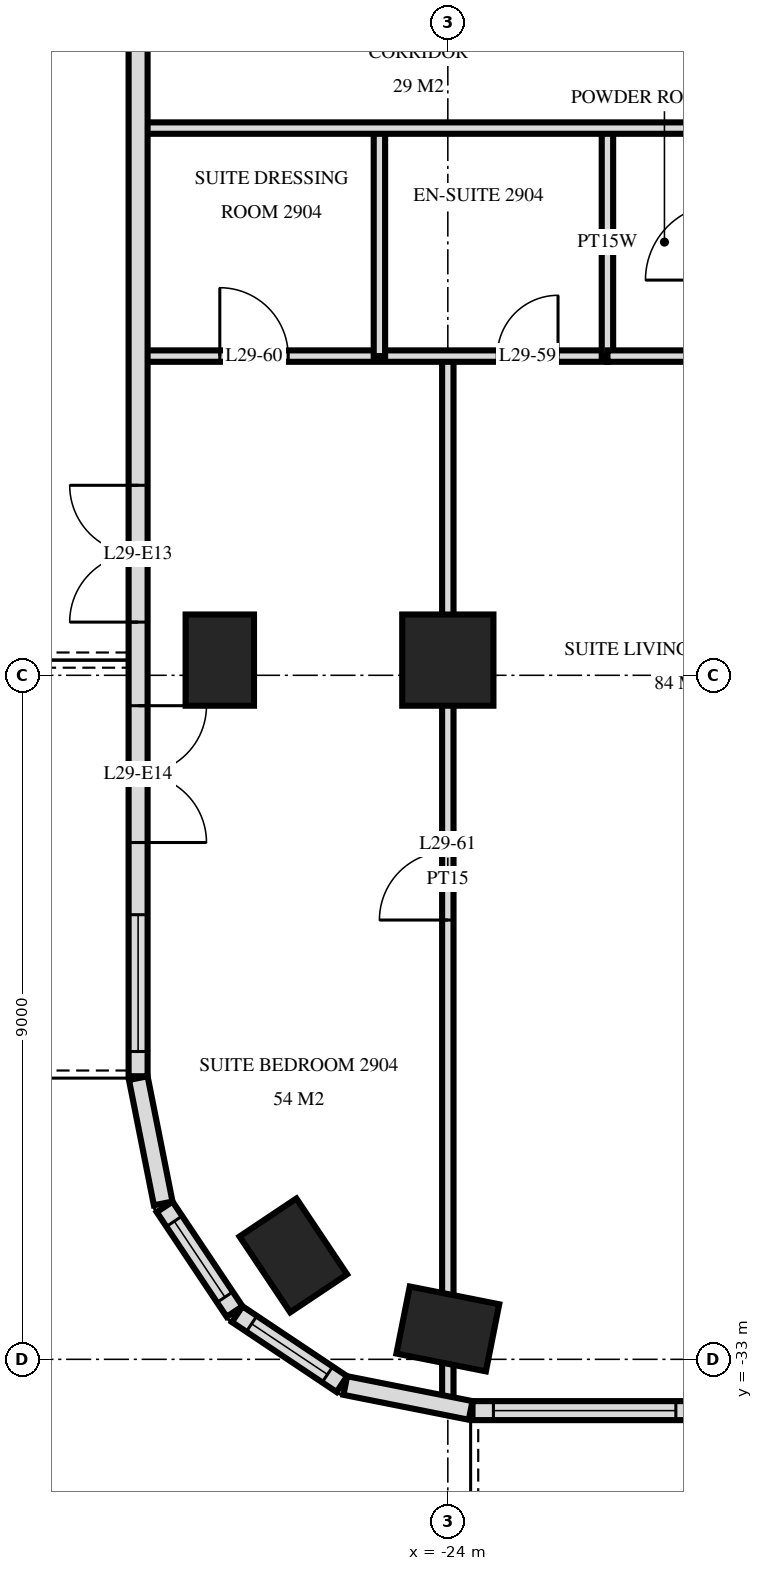
"""IFC4 building model, lengths in metres.
Left out: names, types, materials, properties, quantities, classifications, styles, units other than length and angle.
Written with IfcOpenShell. Run it as: python <this file> out.ifc"""

import sys

from ifc_helpers import new_model, si_unit, direction, frame, frame_2d, origin, origin_2d, place, context, subcontext, project, spatial, rectangle, extrude, element, fill, save


model = new_model("IFC4")
c1 = context("Model", 3, precision=1e-05, world=origin(), true_north=direction((0.0, 1.0)))
c2 = subcontext(c1, "Body", "Model", "MODEL_VIEW")
j1 = project(units=[si_unit("LENGTHUNIT", "METRE"), si_unit("PLANEANGLEUNIT", "RADIAN")], contexts=[c1])
p1 = place(None, origin())
s1 = spatial("IfcSite", under=j1, at=p1, CompositionType="ELEMENT")
p2 = place(p1, origin())
s2 = spatial("IfcBuilding", under=s1, at=p2, CompositionType="ELEMENT")
p3 = place(p2, frame((0.0, 0.0, 116.4)))
s3 = spatial("IfcBuildingStorey", under=s2, at=p3, CompositionType="ELEMENT", Elevation=116.4)
for number, where, z_axis, x_axis in (
    (1, (-27.0, -23.8, 0.0), (0.0, 0.0, 1.0), (0.0, 1.0, 0.0)),
    (2, (-26.033, -31.633, 0.0), (0.0, 0.0, 1.0), (-0.556, 0.831, 0.0)),
    (3, (-24.0, -32.6, 0.0), (0.0, 0.0, 1.0), (-0.981, 0.195, 0.0)),
):
    element("IfcColumn", number, at=place(p3, frame(where, z_axis=z_axis, x_axis=x_axis)), inside=s3, PredefinedType="COLUMN", context=c2, shape_type="SweptSolid", body=[
        extrude(rectangle(XDim=1.2, YDim=0.9, at=origin_2d()), origin(), (0.0, 0.0, 1.0), 3.6),
    ])
p4 = place(p3, frame((-24.0, -23.8, 0.0), z_axis=(0.0, 0.0, 1.0), x_axis=(1.0, 0.0, 0.0)))
e4 = element("IfcColumn", 4, at=p4, inside=s3, PredefinedType="COLUMN", context=c2, shape_type="SweptSolid", body=[
    extrude(rectangle(XDim=1.2, YDim=1.2, at=origin_2d()), origin(), (0.0, 0.0, 1.0), 3.6),
])
p5 = place(p3, frame((-28.075, -3.325, 0.0), z_axis=(0.0, 0.0, 1.0), x_axis=(0.0, -1.0, 0.0)))
e5 = element("IfcWall", 5, at=p5, inside=s3, PredefinedType="SOLIDWALL", context=c2, shape_type="SweptSolid", body=[
    extrude(rectangle(XDim=25.951, YDim=0.25, at=frame_2d((12.975, 0.0))), origin(), (0.0, 0.0, 1.0), 3.32),
])
p6 = place(p5, frame((7.025, 0.0, 0.0)))
e6 = element("IfcOpeningElement", 6, at=p6, cuts=e5, PredefinedType="OPENING", context=c2, shape_type="SweptSolid", body=[
    extrude(rectangle(XDim=1.8, YDim=2.4, at=frame_2d((0.9, 1.2))), frame((0.0, 0.135, 0.0), z_axis=(0.0, -1.0, 0.0), x_axis=(1.0, 0.0, 0.0)), (0.0, 0.0, 1.0), 0.27),
])
p7 = place(p5, frame((18.175, 0.0, 0.0)))
e7 = element("IfcOpeningElement", 7, at=p7, cuts=e5, PredefinedType="OPENING", context=c2, shape_type="SweptSolid", body=[
    extrude(rectangle(XDim=1.8, YDim=2.4, at=frame_2d((0.9, 1.2))), frame((0.0, 0.135, 0.0), z_axis=(0.0, -1.0, 0.0), x_axis=(1.0, 0.0, 0.0)), (0.0, 0.0, 1.0), 0.27),
])
p8 = place(p5, frame((21.075, 0.0, 0.0)))
e8 = element("IfcOpeningElement", 8, at=p8, cuts=e5, PredefinedType="OPENING", context=c2, shape_type="SweptSolid", body=[
    extrude(rectangle(XDim=1.8, YDim=2.4, at=frame_2d((0.9, 1.2))), frame((0.0, 0.135, 0.0), z_axis=(0.0, -1.0, 0.0), x_axis=(1.0, 0.0, 0.0)), (0.0, 0.0, 1.0), 0.27),
])
p9 = place(p5, frame((23.825, 0.0, 0.3)))
e9 = element("IfcOpeningElement", 9, at=p9, cuts=e5, PredefinedType="OPENING", context=c2, shape_type="SweptSolid", body=[
    extrude(rectangle(XDim=1.8, YDim=2.1, at=frame_2d((0.9, 1.05))), frame((0.0, 0.135, 0.0), z_axis=(0.0, -1.0, 0.0), x_axis=(1.0, 0.0, 0.0)), (0.0, 0.0, 1.0), 0.27),
])
p10 = place(p3, frame((-28.073, -29.3, 0.0), z_axis=(0.0, 0.0, 1.0), x_axis=(0.194999110559, -0.980803419081, 0.0)))
e10 = element("IfcWall", 10, at=p10, inside=s3, PredefinedType="SOLIDWALL", context=c2, shape_type="SweptSolid", body=[
    extrude(rectangle(XDim=1.681, YDim=0.25, at=frame_2d((0.841, 0.0))), origin(), (0.0, 0.0, 1.0), 3.32),
])
p11 = place(p3, frame((-27.726, -30.994, 0.0), z_axis=(0.0, 0.0, 1.0), x_axis=(0.55555029066, -0.831482937015, 0.0)))
e11 = element("IfcWall", 11, at=p11, inside=s3, PredefinedType="SOLIDWALL", context=c2, shape_type="SweptSolid", body=[
    extrude(rectangle(XDim=1.656, YDim=0.25, at=frame_2d((0.828, 0.0))), origin(), (0.0, 0.0, 1.0), 3.32),
])
p12 = place(p11, frame((0.228, 0.0, 0.9)))
e12 = element("IfcOpeningElement", 12, at=p12, cuts=e11, PredefinedType="OPENING", context=c2, shape_type="SweptSolid", body=[
    extrude(rectangle(XDim=1.2, YDim=1.5, at=frame_2d((0.6, 0.75))), frame((0.0, 0.135, 0.0), z_axis=(0.0, -1.0, 0.0), x_axis=(1.0, 0.0, 0.0)), (0.0, 0.0, 1.0), 0.27),
])
p13 = place(p3, frame((-26.771, -32.406, 0.0), z_axis=(0.0, 0.0, 1.0), x_axis=(0.831482937015, -0.55555029066, 0.0)))
e13 = element("IfcWall", 13, at=p13, inside=s3, PredefinedType="SOLIDWALL", context=c2, shape_type="SweptSolid", body=[
    extrude(rectangle(XDim=1.656, YDim=0.25, at=frame_2d((0.828, 0.0))), origin(), (0.0, 0.0, 1.0), 3.32),
])
p14 = place(p13, frame((0.228, 0.0, 0.9)))
e14 = element("IfcOpeningElement", 14, at=p14, cuts=e13, PredefinedType="OPENING", context=c2, shape_type="SweptSolid", body=[
    extrude(rectangle(XDim=1.2, YDim=1.5, at=frame_2d((0.6, 0.75))), frame((0.0, 0.135, 0.0), z_axis=(0.0, -1.0, 0.0), x_axis=(1.0, 0.0, 0.0)), (0.0, 0.0, 1.0), 0.27),
])
p15 = place(p3, frame((-25.349, -33.344, 0.0), z_axis=(0.0, 0.0, 1.0), x_axis=(0.980775640221, -0.19513878023, 0.0)))
e15 = element("IfcWall", 15, at=p15, inside=s3, PredefinedType="SOLIDWALL", context=c2, shape_type="SweptSolid", body=[
    extrude(rectangle(XDim=1.681, YDim=0.25, at=frame_2d((0.841, 0.0))), origin(), (0.0, 0.0, 1.0), 3.32),
])
p16 = place(p3, frame((-23.675, -33.675, 0.0), z_axis=(0.0, 0.0, 1.0), x_axis=(1.0, 0.0, 0.0)))
e16 = element("IfcWall", 16, at=p16, inside=s3, PredefinedType="SOLIDWALL", context=c2, shape_type="SweptSolid", body=[
    extrude(rectangle(XDim=47.351, YDim=0.25, at=frame_2d((23.675, 0.0))), origin(), (0.0, 0.0, 1.0), 3.32),
])
p17 = place(p16, frame((0.275, 0.0, 0.3)))
e17 = element("IfcOpeningElement", 17, at=p17, cuts=e16, PredefinedType="OPENING", context=c2, shape_type="SweptSolid", body=[
    extrude(rectangle(XDim=2.4, YDim=2.1, at=frame_2d((1.2, 1.05))), frame((0.0, 0.135, 0.0), z_axis=(0.0, -1.0, 0.0), x_axis=(1.0, 0.0, 0.0)), (0.0, 0.0, 1.0), 0.27),
])
p18 = place(p16, frame((3.425, 0.0, 0.0)))
e18 = element("IfcOpeningElement", 18, at=p18, cuts=e16, PredefinedType="OPENING", context=c2, shape_type="SweptSolid", body=[
    extrude(rectangle(XDim=1.8, YDim=2.4, at=frame_2d((0.9, 1.2))), frame((0.0, 0.135, 0.0), z_axis=(0.0, -1.0, 0.0), x_axis=(1.0, 0.0, 0.0)), (0.0, 0.0, 1.0), 0.27),
])
p19 = place(p16, frame((5.975, 0.0, 0.3)))
e19 = element("IfcOpeningElement", 19, at=p19, cuts=e16, PredefinedType="OPENING", context=c2, shape_type="SweptSolid", body=[
    extrude(rectangle(XDim=2.4, YDim=2.1, at=frame_2d((1.2, 1.05))), frame((0.0, 0.135, 0.0), z_axis=(0.0, -1.0, 0.0), x_axis=(1.0, 0.0, 0.0)), (0.0, 0.0, 1.0), 0.27),
])
p20 = place(p16, frame((9.275, 0.0, 0.0)))
e20 = element("IfcOpeningElement", 20, at=p20, cuts=e16, PredefinedType="OPENING", context=c2, shape_type="SweptSolid", body=[
    extrude(rectangle(XDim=1.8, YDim=2.4, at=frame_2d((0.9, 1.2))), frame((0.0, 0.135, 0.0), z_axis=(0.0, -1.0, 0.0), x_axis=(1.0, 0.0, 0.0)), (0.0, 0.0, 1.0), 0.27),
])
p21 = place(p16, frame((12.275, 0.0, 0.0)))
e21 = element("IfcOpeningElement", 21, at=p21, cuts=e16, PredefinedType="OPENING", context=c2, shape_type="SweptSolid", body=[
    extrude(rectangle(XDim=1.8, YDim=2.4, at=frame_2d((0.9, 1.2))), frame((0.0, 0.135, 0.0), z_axis=(0.0, -1.0, 0.0), x_axis=(1.0, 0.0, 0.0)), (0.0, 0.0, 1.0), 0.27),
])
p22 = place(p16, frame((14.975, 0.0, 0.3)))
e22 = element("IfcOpeningElement", 22, at=p22, cuts=e16, PredefinedType="OPENING", context=c2, shape_type="SweptSolid", body=[
    extrude(rectangle(XDim=2.4, YDim=2.1, at=frame_2d((1.2, 1.05))), frame((0.0, 0.135, 0.0), z_axis=(0.0, -1.0, 0.0), x_axis=(1.0, 0.0, 0.0)), (0.0, 0.0, 1.0), 0.27),
])
p23 = place(p16, frame((17.975, 0.0, 0.3)))
e23 = element("IfcOpeningElement", 23, at=p23, cuts=e16, PredefinedType="OPENING", context=c2, shape_type="SweptSolid", body=[
    extrude(rectangle(XDim=2.4, YDim=2.1, at=frame_2d((1.2, 1.05))), frame((0.0, 0.135, 0.0), z_axis=(0.0, -1.0, 0.0), x_axis=(1.0, 0.0, 0.0)), (0.0, 0.0, 1.0), 0.27),
])
p24 = place(p16, frame((21.275, 0.0, 0.0)))
e24 = element("IfcOpeningElement", 24, at=p24, cuts=e16, PredefinedType="OPENING", context=c2, shape_type="SweptSolid", body=[
    extrude(rectangle(XDim=1.8, YDim=2.4, at=frame_2d((0.9, 1.2))), frame((0.0, 0.135, 0.0), z_axis=(0.0, -1.0, 0.0), x_axis=(1.0, 0.0, 0.0)), (0.0, 0.0, 1.0), 0.27),
])
p25 = place(p16, frame((24.275, 0.0, 0.0)))
e25 = element("IfcOpeningElement", 25, at=p25, cuts=e16, PredefinedType="OPENING", context=c2, shape_type="SweptSolid", body=[
    extrude(rectangle(XDim=1.8, YDim=2.4, at=frame_2d((0.9, 1.2))), frame((0.0, 0.135, 0.0), z_axis=(0.0, -1.0, 0.0), x_axis=(1.0, 0.0, 0.0)), (0.0, 0.0, 1.0), 0.27),
])
p26 = place(p16, frame((26.975, 0.0, 0.3)))
e26 = element("IfcOpeningElement", 26, at=p26, cuts=e16, PredefinedType="OPENING", context=c2, shape_type="SweptSolid", body=[
    extrude(rectangle(XDim=2.4, YDim=2.1, at=frame_2d((1.2, 1.05))), frame((0.0, 0.135, 0.0), z_axis=(0.0, -1.0, 0.0), x_axis=(1.0, 0.0, 0.0)), (0.0, 0.0, 1.0), 0.27),
])
p27 = place(p16, frame((30.275, 0.0, 0.0)))
e27 = element("IfcOpeningElement", 27, at=p27, cuts=e16, PredefinedType="OPENING", context=c2, shape_type="SweptSolid", body=[
    extrude(rectangle(XDim=1.8, YDim=2.4, at=frame_2d((0.9, 1.2))), frame((0.0, 0.135, 0.0), z_axis=(0.0, -1.0, 0.0), x_axis=(1.0, 0.0, 0.0)), (0.0, 0.0, 1.0), 0.27),
])
p28 = place(p16, frame((32.975, 0.0, 0.3)))
e28 = element("IfcOpeningElement", 28, at=p28, cuts=e16, PredefinedType="OPENING", context=c2, shape_type="SweptSolid", body=[
    extrude(rectangle(XDim=2.4, YDim=2.1, at=frame_2d((1.2, 1.05))), frame((0.0, 0.135, 0.0), z_axis=(0.0, -1.0, 0.0), x_axis=(1.0, 0.0, 0.0)), (0.0, 0.0, 1.0), 0.27),
])
p29 = place(p16, frame((35.975, 0.0, 0.3)))
e29 = element("IfcOpeningElement", 29, at=p29, cuts=e16, PredefinedType="OPENING", context=c2, shape_type="SweptSolid", body=[
    extrude(rectangle(XDim=2.4, YDim=2.1, at=frame_2d((1.2, 1.05))), frame((0.0, 0.135, 0.0), z_axis=(0.0, -1.0, 0.0), x_axis=(1.0, 0.0, 0.0)), (0.0, 0.0, 1.0), 0.27),
])
p30 = place(p16, frame((39.275, 0.0, 0.0)))
e30 = element("IfcOpeningElement", 30, at=p30, cuts=e16, PredefinedType="OPENING", context=c2, shape_type="SweptSolid", body=[
    extrude(rectangle(XDim=1.8, YDim=2.4, at=frame_2d((0.9, 1.2))), frame((0.0, 0.135, 0.0), z_axis=(0.0, -1.0, 0.0), x_axis=(1.0, 0.0, 0.0)), (0.0, 0.0, 1.0), 0.27),
])
p31 = place(p16, frame((41.975, 0.0, 0.3)))
e31 = element("IfcOpeningElement", 31, at=p31, cuts=e16, PredefinedType="OPENING", context=c2, shape_type="SweptSolid", body=[
    extrude(rectangle(XDim=2.4, YDim=2.1, at=frame_2d((1.2, 1.05))), frame((0.0, 0.135, 0.0), z_axis=(0.0, -1.0, 0.0), x_axis=(1.0, 0.0, 0.0)), (0.0, 0.0, 1.0), 0.27),
])
p32 = place(p16, frame((45.125, 0.0, 0.0)))
e32 = element("IfcOpeningElement", 32, at=p32, cuts=e16, PredefinedType="OPENING", context=c2, shape_type="SweptSolid", body=[
    extrude(rectangle(XDim=1.8, YDim=2.4, at=frame_2d((0.9, 1.2))), frame((0.0, 0.135, 0.0), z_axis=(0.0, -1.0, 0.0), x_axis=(1.0, 0.0, 0.0)), (0.0, 0.0, 1.0), 0.27),
])
p33 = place(p3, frame((-21.9, -19.8, 0.0), z_axis=(0.0, 0.0, 1.0), x_axis=(0.0, 1.0, 0.0)))
e33 = element("IfcWall", 33, at=p33, inside=s3, PredefinedType="PLUMBINGWALL", context=c2, shape_type="SweptSolid", body=[
    extrude(rectangle(XDim=3.0, YDim=0.15, at=frame_2d((1.5, 0.0))), origin(), (0.0, 0.0, 1.0), 3.32),
])
p34 = place(p3, frame((-24.0, -33.557, 0.0), z_axis=(0.0, 0.0, 1.0), x_axis=(0.0, 1.0, 0.0)))
e34 = element("IfcWall", 34, at=p34, inside=s3, PredefinedType="PARTITIONING", context=c2, shape_type="SweptSolid", body=[
    extrude(rectangle(XDim=13.757, YDim=0.15, at=frame_2d((6.878, 0.0))), origin(), (0.0, 0.0, 1.0), 3.32),
])
p35 = place(p34, frame((6.337, 0.0, 0.0)))
e35 = element("IfcOpeningElement", 35, at=p35, cuts=e34, PredefinedType="OPENING", context=c2, shape_type="SweptSolid", body=[
    extrude(rectangle(XDim=0.9, YDim=2.1, at=frame_2d((0.45, 1.05))), frame((0.0, 0.085, 0.0), z_axis=(0.0, -1.0, 0.0), x_axis=(1.0, 0.0, 0.0)), (0.0, 0.0, 1.0), 0.17),
])
p36 = place(p3, frame((-24.9, -19.8, 0.0), z_axis=(0.0, 0.0, 1.0), x_axis=(0.0, 1.0, 0.0)))
e36 = element("IfcWall", 36, at=p36, inside=s3, PredefinedType="PARTITIONING", context=c2, shape_type="SweptSolid", body=[
    extrude(rectangle(XDim=3.0, YDim=0.15, at=frame_2d((1.5, 0.0))), origin(), (0.0, 0.0, 1.0), 3.32),
])
p37 = place(p3, frame((-28.02, -19.8, 0.0), z_axis=(0.0, 0.0, 1.0), x_axis=(1.0, 0.0, 0.0)))
e37 = element("IfcWall", 37, at=p37, inside=s3, PredefinedType="PARTITIONING", context=c2, shape_type="SweptSolid", body=[
    extrude(rectangle(XDim=6.12, YDim=0.15, at=frame_2d((3.06, 0.0))), origin(), (0.0, 0.0, 1.0), 3.32),
])
p38 = place(p37, frame((4.67, 0.0, 0.0)))
e38 = element("IfcOpeningElement", 38, at=p38, cuts=e37, PredefinedType="OPENING", context=c2, shape_type="SweptSolid", body=[
    extrude(rectangle(XDim=0.8, YDim=2.1, at=frame_2d((0.4, 1.05))), frame((0.0, 0.085, 0.0), z_axis=(0.0, -1.0, 0.0), x_axis=(1.0, 0.0, 0.0)), (0.0, 0.0, 1.0), 0.17),
])
p39 = place(p37, frame((1.02, 0.0, 0.0)))
e39 = element("IfcOpeningElement", 39, at=p39, cuts=e37, PredefinedType="OPENING", context=c2, shape_type="SweptSolid", body=[
    extrude(rectangle(XDim=0.9, YDim=2.1, at=frame_2d((0.45, 1.05))), frame((0.0, 0.085, 0.0), z_axis=(0.0, -1.0, 0.0), x_axis=(1.0, 0.0, 0.0)), (0.0, 0.0, 1.0), 0.17),
])
p40 = place(p3, frame((-21.9, -19.8, 0.0), z_axis=(0.0, 0.0, 1.0), x_axis=(1.0, 0.0, 0.0)))
e40 = element("IfcWall", 40, at=p40, inside=s3, PredefinedType="PLUMBINGWALL", context=c2, shape_type="SweptSolid", body=[
    extrude(rectangle(XDim=1.5, YDim=0.15, at=frame_2d((0.75, 0.0))), origin(), (0.0, 0.0, 1.0), 3.32),
])
p41 = place(p3, frame((-28.02, -16.8, 0.0), z_axis=(0.0, 0.0, 1.0), x_axis=(1.0, 0.0, 0.0)))
e41 = element("IfcWall", 41, at=p41, inside=s3, PredefinedType="PARTITIONING", context=c2, shape_type="SweptSolid", body=[
    extrude(rectangle(XDim=56.04, YDim=0.15, at=frame_2d((28.02, 0.0))), origin(), (0.0, 0.0, 1.0), 3.32),
])
p42 = place(p41, frame((13.17, 0.0, 0.0)))
e42 = element("IfcOpeningElement", 42, at=p42, cuts=e41, PredefinedType="OPENING", context=c2, shape_type="SweptSolid", body=[
    extrude(rectangle(XDim=1.0, YDim=2.1, at=frame_2d((0.5, 1.05))), frame((0.0, 0.085, 0.0), z_axis=(0.0, -1.0, 0.0), x_axis=(1.0, 0.0, 0.0)), (0.0, 0.0, 1.0), 0.17),
])
p43 = place(p41, frame((11.87, 0.0, 0.0)))
e43 = element("IfcOpeningElement", 43, at=p43, cuts=e41, PredefinedType="OPENING", context=c2, shape_type="SweptSolid", body=[
    extrude(rectangle(XDim=1.0, YDim=2.1, at=frame_2d((0.5, 1.05))), frame((0.0, 0.085, 0.0), z_axis=(0.0, -1.0, 0.0), x_axis=(1.0, 0.0, 0.0)), (0.0, 0.0, 1.0), 0.17),
])
p44 = place(p41, frame((8.32, 0.0, 0.0)))
e44 = element("IfcOpeningElement", 44, at=p44, cuts=e41, PredefinedType="OPENING", context=c2, shape_type="SweptSolid", body=[
    extrude(rectangle(XDim=1.0, YDim=2.1, at=frame_2d((0.5, 1.05))), frame((0.0, 0.085, 0.0), z_axis=(0.0, -1.0, 0.0), x_axis=(1.0, 0.0, 0.0)), (0.0, 0.0, 1.0), 0.17),
])
p45 = place(p41, frame((40.42, 0.0, 0.0)))
e45 = element("IfcOpeningElement", 45, at=p45, cuts=e41, PredefinedType="OPENING", context=c2, shape_type="SweptSolid", body=[
    extrude(rectangle(XDim=1.0, YDim=2.1, at=frame_2d((0.5, 1.05))), frame((0.0, 0.085, 0.0), z_axis=(0.0, -1.0, 0.0), x_axis=(1.0, 0.0, 0.0)), (0.0, 0.0, 1.0), 0.17),
])
p46 = place(p41, frame((46.72, 0.0, 0.0)))
e46 = element("IfcOpeningElement", 46, at=p46, cuts=e41, PredefinedType="OPENING", context=c2, shape_type="SweptSolid", body=[
    extrude(rectangle(XDim=1.0, YDim=2.1, at=frame_2d((0.5, 1.05))), frame((0.0, 0.085, 0.0), z_axis=(0.0, -1.0, 0.0), x_axis=(1.0, 0.0, 0.0)), (0.0, 0.0, 1.0), 0.17),
])
p47 = place(p41, frame((21.52, 0.0, 0.0)))
e47 = element("IfcOpeningElement", 47, at=p47, cuts=e41, PredefinedType="OPENING", context=c2, shape_type="SweptSolid", body=[
    extrude(rectangle(XDim=1.0, YDim=2.1, at=frame_2d((0.5, 1.05))), frame((0.0, 0.085, 0.0), z_axis=(0.0, -1.0, 0.0), x_axis=(1.0, 0.0, 0.0)), (0.0, 0.0, 1.0), 0.17),
])
p48 = place(p41, frame((30.52, 0.0, 0.0)))
e48 = element("IfcOpeningElement", 48, at=p48, cuts=e41, PredefinedType="OPENING", context=c2, shape_type="SweptSolid", body=[
    extrude(rectangle(XDim=1.0, YDim=2.1, at=frame_2d((0.5, 1.05))), frame((0.0, 0.085, 0.0), z_axis=(0.0, -1.0, 0.0), x_axis=(1.0, 0.0, 0.0)), (0.0, 0.0, 1.0), 0.17),
])
p49 = place(p41, frame((36.52, 0.0, 0.0)))
e49 = element("IfcOpeningElement", 49, at=p49, cuts=e41, PredefinedType="OPENING", context=c2, shape_type="SweptSolid", body=[
    extrude(rectangle(XDim=1.0, YDim=2.1, at=frame_2d((0.5, 1.05))), frame((0.0, 0.085, 0.0), z_axis=(0.0, -1.0, 0.0), x_axis=(1.0, 0.0, 0.0)), (0.0, 0.0, 1.0), 0.17),
])
p50 = place(p12, origin())
e50 = element("IfcWindow", 50, at=p50, inside=s3, PartitioningType="SINGLE_PANEL", PredefinedType="WINDOW", context=c2, shape_type="SweptSolid", body=[
    extrude(rectangle(XDim=1.2, YDim=1.5, at=frame_2d((0.6, 0.75))), frame((0.0, 0.03, 0.0), z_axis=(0.0, -1.0, 0.0), x_axis=(1.0, 0.0, 0.0)), (0.0, 0.0, 1.0), 0.06),
])
fill(e12, e50)
p51 = place(p14, origin())
e51 = element("IfcWindow", 51, at=p51, inside=s3, PartitioningType="SINGLE_PANEL", PredefinedType="WINDOW", context=c2, shape_type="SweptSolid", body=[
    extrude(rectangle(XDim=1.2, YDim=1.5, at=frame_2d((0.6, 0.75))), frame((0.0, 0.03, 0.0), z_axis=(0.0, -1.0, 0.0), x_axis=(1.0, 0.0, 0.0)), (0.0, 0.0, 1.0), 0.06),
])
fill(e14, e51)
p52 = place(p17, origin())
e52 = element("IfcWindow", 52, at=p52, inside=s3, PartitioningType="SINGLE_PANEL", PredefinedType="WINDOW", context=c2, shape_type="SweptSolid", body=[
    extrude(rectangle(XDim=2.4, YDim=2.1, at=frame_2d((1.2, 1.05))), frame((0.0, 0.03, 0.0), z_axis=(0.0, -1.0, 0.0), x_axis=(1.0, 0.0, 0.0)), (0.0, 0.0, 1.0), 0.06),
])
fill(e17, e52)
p53 = place(p7, frame((0.9, 0.0, 0.0), z_axis=(0.0, 0.0, 1.0), x_axis=(-1.0, 0.0, 0.0)))
e53 = element("IfcDoor", 53, at=p53, inside=s3, OperationType="DOUBLE_DOOR_SINGLE_SWING", PredefinedType="DOOR", context=c2, shape_type="SweptSolid", body=[
    extrude(rectangle(XDim=1.8, YDim=2.4, at=frame_2d((0.0, 1.2))), frame((0.0, -0.025, 0.0), z_axis=(0.0, 1.0, 0.0), x_axis=(-1.0, 0.0, 0.0)), (0.0, 0.0, 1.0), 0.05),
])
fill(e7, e53)
p54 = place(p8, origin())
e54 = element("IfcDoor", 54, at=p54, inside=s3, OperationType="DOUBLE_DOOR_SINGLE_SWING", PredefinedType="DOOR", context=c2, shape_type="SweptSolid", body=[
    extrude(rectangle(XDim=1.8, YDim=2.4, at=frame_2d((0.9, 1.2))), frame((0.0, 0.025, 0.0), z_axis=(0.0, -1.0, 0.0), x_axis=(1.0, 0.0, 0.0)), (0.0, 0.0, 1.0), 0.05),
])
fill(e8, e54)
p55 = place(p9, origin())
e55 = element("IfcWindow", 55, at=p55, inside=s3, PartitioningType="SINGLE_PANEL", PredefinedType="WINDOW", context=c2, shape_type="SweptSolid", body=[
    extrude(rectangle(XDim=1.8, YDim=2.1, at=frame_2d((0.9, 1.05))), frame((0.0, 0.03, 0.0), z_axis=(0.0, -1.0, 0.0), x_axis=(1.0, 0.0, 0.0)), (0.0, 0.0, 1.0), 0.06),
])
fill(e9, e55)
p56 = place(p38, origin())
e56 = element("IfcDoor", 56, at=p56, inside=s3, OperationType="SINGLE_SWING_LEFT", PredefinedType="DOOR", context=c2, shape_type="SweptSolid", body=[
    extrude(rectangle(XDim=0.8, YDim=2.1, at=frame_2d((0.4, 1.05))), frame((0.0, 0.025, 0.0), z_axis=(0.0, -1.0, 0.0), x_axis=(1.0, 0.0, 0.0)), (0.0, 0.0, 1.0), 0.05),
])
fill(e38, e56)
p57 = place(p39, origin())
e57 = element("IfcDoor", 57, at=p57, inside=s3, OperationType="SINGLE_SWING_RIGHT", PredefinedType="DOOR", context=c2, shape_type="SweptSolid", body=[
    extrude(rectangle(XDim=0.9, YDim=2.1, at=frame_2d((0.45, 1.05))), frame((0.0, 0.025, 0.0), z_axis=(0.0, -1.0, 0.0), x_axis=(1.0, 0.0, 0.0)), (0.0, 0.0, 1.0), 0.05),
])
fill(e39, e57)
p58 = place(p35, origin())
e58 = element("IfcDoor", 58, at=p58, inside=s3, OperationType="SINGLE_SWING_RIGHT", PredefinedType="DOOR", context=c2, shape_type="SweptSolid", body=[
    extrude(rectangle(XDim=0.9, YDim=2.1, at=frame_2d((0.45, 1.05))), frame((0.0, 0.025, 0.0), z_axis=(0.0, -1.0, 0.0), x_axis=(1.0, 0.0, 0.0)), (0.0, 0.0, 1.0), 0.05),
])
fill(e35, e58)
save(model, sys.argv[1])
